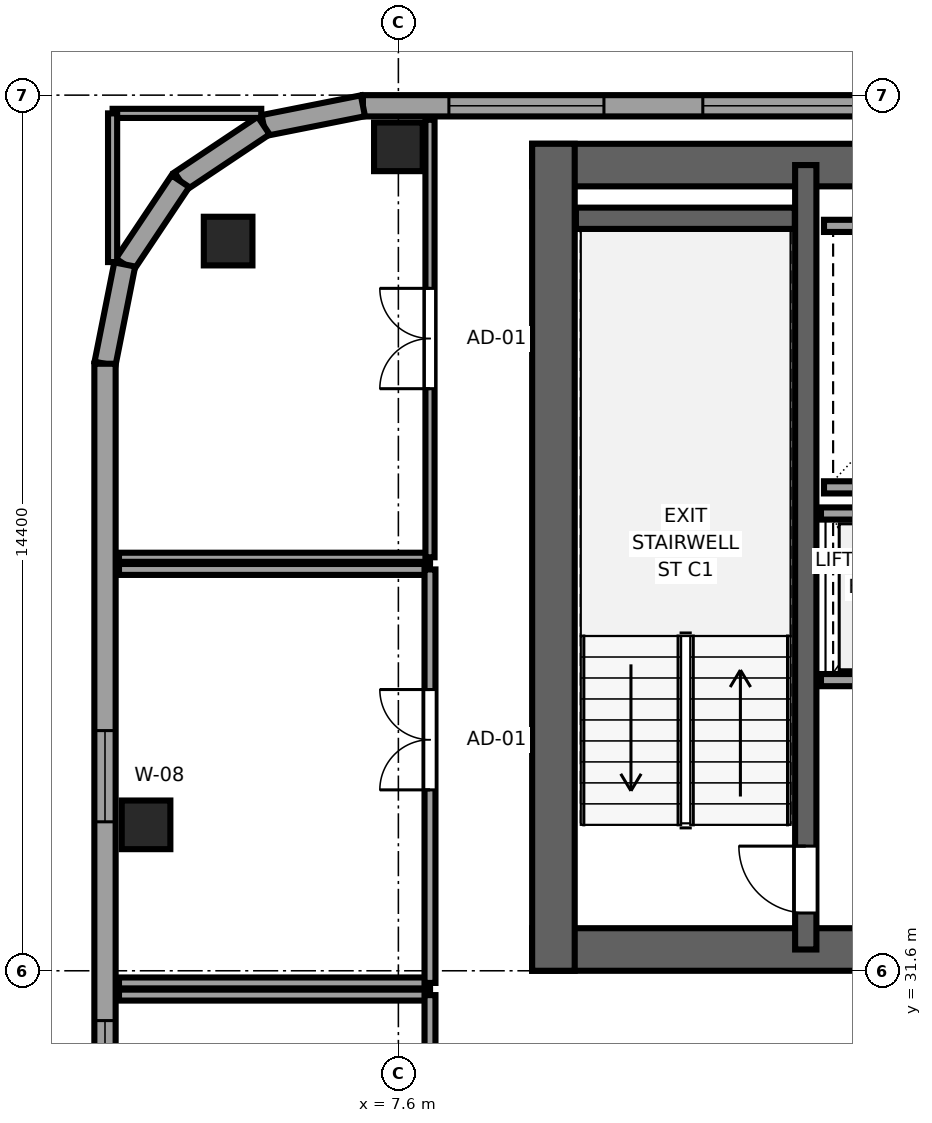
"""IFC4 building model, lengths in metres.
Left out: names, types, materials, properties, quantities, classifications, styles, units other than length and angle.
Written with IfcOpenShell. Run it as: python <this file> out.ifc"""

import sys

from ifc_helpers import new_model, si_unit, direction, frame, frame_2d, origin, origin_2d, place, context, subcontext, project, spatial, rectangle, extrude, source, transform, mapped, element, fill, save


model = new_model("IFC4")
c1 = context("Model", 3, precision=1e-05, world=origin(), true_north=direction((0.0, 1.0)))
c2 = subcontext(c1, "Body", "Model", "MODEL_VIEW")
j1 = project(units=[si_unit("LENGTHUNIT", "METRE"), si_unit("PLANEANGLEUNIT", "RADIAN")], contexts=[c1])
p1 = place(None, origin())
s1 = spatial("IfcSite", under=j1, at=p1, CompositionType="ELEMENT")
p2 = place(p1, origin())
s2 = spatial("IfcBuilding", under=s1, at=p2, CompositionType="ELEMENT")
p3 = place(p2, frame((0.0, 0.0, 171.9)))
s3 = spatial("IfcBuildingStorey", under=s2, at=p3, CompositionType="ELEMENT", Elevation=171.9)
p4 = place(p3, frame((9.8, 31.95, 0.0), z_axis=(0.0, 0.0, 1.0), x_axis=(1.0, 0.0, 0.0)))
e1 = element("IfcWall", 1, at=p4, inside=s3, PredefinedType="SHEAR", context=c2, shape_type="SweptSolid", body=[
    extrude(rectangle(XDim=26.4, YDim=0.7, at=frame_2d((13.2, 0.0))), origin(), (0.0, 0.0, 1.0), 3.55),
])
p5 = place(p4, frame((7.65, 0.0, 0.0), z_axis=(0.0, 0.0, 1.0), x_axis=(-1.0, 0.0, 0.0)))
e2 = element("IfcOpeningElement", 2, at=p5, cuts=e1, PredefinedType="OPENING", context=c2, shape_type="SweptSolid", body=[
    extrude(rectangle(XDim=1.5, YDim=2.04, at=frame_2d((0.75, 1.02))), frame((0.0, 0.36, 0.0), z_axis=(0.0, -1.0, 0.0), x_axis=(1.0, 0.0, 0.0)), (0.0, 0.0, 1.0), 0.72),
])
p6 = place(p4, frame((13.95, 0.0, 0.0), z_axis=(0.0, 0.0, 1.0), x_axis=(-1.0, 0.0, 0.0)))
e3 = element("IfcOpeningElement", 3, at=p6, cuts=e1, PredefinedType="OPENING", context=c2, shape_type="SweptSolid", body=[
    extrude(rectangle(XDim=1.5, YDim=2.04, at=frame_2d((0.75, 1.02))), frame((0.0, 0.36, 0.0), z_axis=(0.0, -1.0, 0.0), x_axis=(1.0, 0.0, 0.0)), (0.0, 0.0, 1.0), 0.72),
])
p7 = place(p4, frame((20.25, 0.0, 0.0), z_axis=(0.0, 0.0, 1.0), x_axis=(-1.0, 0.0, 0.0)))
e4 = element("IfcOpeningElement", 4, at=p7, cuts=e1, PredefinedType="OPENING", context=c2, shape_type="SweptSolid", body=[
    extrude(rectangle(XDim=1.5, YDim=2.04, at=frame_2d((0.75, 1.02))), frame((0.0, 0.36, 0.0), z_axis=(0.0, -1.0, 0.0), x_axis=(1.0, 0.0, 0.0)), (0.0, 0.0, 1.0), 0.72),
])
p8 = place(p3, frame((9.8, 44.85, 0.0), z_axis=(0.0, 0.0, 1.0), x_axis=(1.0, 0.0, 0.0)))
e5 = element("IfcWall", 5, at=p8, inside=s3, PredefinedType="SHEAR", context=c2, shape_type="SweptSolid", body=[
    extrude(rectangle(XDim=26.4, YDim=0.7, at=frame_2d((13.2, 0.0))), origin(), (0.0, 0.0, 1.0), 3.55),
])
p9 = place(p3, frame((10.15, 31.6, 0.0), z_axis=(0.0, 0.0, 1.0), x_axis=(0.0, 1.0, 0.0)))
e6 = element("IfcWall", 6, at=p9, inside=s3, PredefinedType="SHEAR", context=c2, shape_type="SweptSolid", body=[
    extrude(rectangle(XDim=13.6, YDim=0.7, at=frame_2d((6.8, 0.0))), origin(), (0.0, 0.0, 1.0), 3.55),
])
p10 = place(p3, frame((14.3, 31.95, 0.0), z_axis=(0.0, 0.0, 1.0), x_axis=(0.0, 1.0, 0.0)))
e7 = element("IfcWall", 7, at=p10, inside=s3, PredefinedType="SHEAR", context=c2, shape_type="SweptSolid", body=[
    extrude(rectangle(XDim=12.9, YDim=0.35, at=frame_2d((6.45, 0.0))), origin(), (0.0, 0.0, 1.0), 3.55),
])
p11 = place(p10, frame((0.6, 0.0, 0.0)))
e8 = element("IfcOpeningElement", 8, at=p11, cuts=e7, PredefinedType="OPENING", context=c2, shape_type="SweptSolid", body=[
    extrude(rectangle(XDim=1.1, YDim=2.12, at=frame_2d((0.55, 1.06))), frame((0.0, 0.185, 0.0), z_axis=(0.0, -1.0, 0.0), x_axis=(1.0, 0.0, 0.0)), (0.0, 0.0, 1.0), 0.37),
])
p12 = place(p3, frame((10.52, 43.975, 0.0), z_axis=(0.0, 0.0, 1.0), x_axis=(1.0, 0.0, 0.0)))
e9 = element("IfcWall", 9, at=p12, inside=s3, PredefinedType="SHEAR", context=c2, shape_type="SweptSolid", body=[
    extrude(rectangle(XDim=3.6, YDim=0.35, at=frame_2d((1.8, 0.0))), origin(), (0.0, 0.0, 1.0), 3.55),
])
m1 = source(origin(), c2, "Body", "SweptSolid", [
    extrude(rectangle(XDim=0.8, YDim=0.8, at=origin_2d()), origin(), (0.0, 0.0, 1.0), 3.55),
])
for number, where, z_axis, x_axis in (
    (10, (4.8, 43.6, 0.0), (0.0, 0.0, 1.0), (1.0, 0.0, 0.0)),
    (11, (7.6, 45.15, 0.0), (0.0, 0.0, 1.0), (1.0, 0.0, 0.0)),
    (12, (3.45, 34.0, 0.0), (0.0, 0.0, 1.0), (1.0, 0.0, 0.0)),
):
    element("IfcColumn", number, at=place(p3, frame(where, z_axis=z_axis, x_axis=x_axis)), inside=s3, PredefinedType="COLUMN", context=c2, shape_type="MappedRepresentation", body=[
        mapped(m1, transform((0.0, 0.0, 0.0), x_axis=(1.0, 0.0, 0.0), y_axis=(0.0, 1.0, 0.0), z_axis=(0.0, 0.0, 1.0), scale=1.0)),
    ])
p13 = place(p3, frame((49.983, 45.825, 0.0), z_axis=(0.0, 0.0, 1.0), x_axis=(-1.0, 0.0, 0.0)))
e13 = element("IfcWall", 13, at=p13, inside=s3, PredefinedType="SOLIDWALL", context=c2, shape_type="SweptSolid", body=[
    extrude(rectangle(XDim=42.966, YDim=0.35, at=frame_2d((21.483, 0.0))), origin(), (0.0, 0.0, 1.0), 3.37),
])
p14 = place(p13, frame((1.413, 0.0, 0.68)))
e14 = element("IfcOpeningElement", 14, at=p14, cuts=e13, PredefinedType="OPENING", context=c2, shape_type="SweptSolid", body=[
    extrude(rectangle(XDim=2.55, YDim=1.92, at=frame_2d((1.275, 0.96))), frame((0.0, 0.185, 0.0), z_axis=(0.0, -1.0, 0.0), x_axis=(1.0, 0.0, 0.0)), (0.0, 0.0, 1.0), 0.37),
])
p15 = place(p13, frame((9.766, 0.0, 0.68)))
e15 = element("IfcOpeningElement", 15, at=p15, cuts=e13, PredefinedType="OPENING", context=c2, shape_type="SweptSolid", body=[
    extrude(rectangle(XDim=2.55, YDim=1.92, at=frame_2d((1.275, 0.96))), frame((0.0, 0.185, 0.0), z_axis=(0.0, -1.0, 0.0), x_axis=(1.0, 0.0, 0.0)), (0.0, 0.0, 1.0), 0.37),
])
p16 = place(p13, frame((13.943, 0.0, 0.68)))
e16 = element("IfcOpeningElement", 16, at=p16, cuts=e13, PredefinedType="OPENING", context=c2, shape_type="SweptSolid", body=[
    extrude(rectangle(XDim=2.55, YDim=1.92, at=frame_2d((1.275, 0.96))), frame((0.0, 0.185, 0.0), z_axis=(0.0, -1.0, 0.0), x_axis=(1.0, 0.0, 0.0)), (0.0, 0.0, 1.0), 0.37),
])
p17 = place(p13, frame((18.12, 0.0, 0.68)))
e17 = element("IfcOpeningElement", 17, at=p17, cuts=e13, PredefinedType="OPENING", context=c2, shape_type="SweptSolid", body=[
    extrude(rectangle(XDim=2.55, YDim=1.92, at=frame_2d((1.275, 0.96))), frame((0.0, 0.185, 0.0), z_axis=(0.0, -1.0, 0.0), x_axis=(1.0, 0.0, 0.0)), (0.0, 0.0, 1.0), 0.37),
])
p18 = place(p13, frame((22.296, 0.0, 0.68)))
e18 = element("IfcOpeningElement", 18, at=p18, cuts=e13, PredefinedType="OPENING", context=c2, shape_type="SweptSolid", body=[
    extrude(rectangle(XDim=2.55, YDim=1.92, at=frame_2d((1.275, 0.96))), frame((0.0, 0.185, 0.0), z_axis=(0.0, -1.0, 0.0), x_axis=(1.0, 0.0, 0.0)), (0.0, 0.0, 1.0), 0.37),
])
p19 = place(p13, frame((26.473, 0.0, 0.68)))
e19 = element("IfcOpeningElement", 19, at=p19, cuts=e13, PredefinedType="OPENING", context=c2, shape_type="SweptSolid", body=[
    extrude(rectangle(XDim=2.55, YDim=1.92, at=frame_2d((1.275, 0.96))), frame((0.0, 0.185, 0.0), z_axis=(0.0, -1.0, 0.0), x_axis=(1.0, 0.0, 0.0)), (0.0, 0.0, 1.0), 0.37),
])
p20 = place(p13, frame((30.649, 0.0, 0.68)))
e20 = element("IfcOpeningElement", 20, at=p20, cuts=e13, PredefinedType="OPENING", context=c2, shape_type="SweptSolid", body=[
    extrude(rectangle(XDim=2.55, YDim=1.92, at=frame_2d((1.275, 0.96))), frame((0.0, 0.185, 0.0), z_axis=(0.0, -1.0, 0.0), x_axis=(1.0, 0.0, 0.0)), (0.0, 0.0, 1.0), 0.37),
])
p21 = place(p13, frame((34.826, 0.0, 0.68)))
e21 = element("IfcOpeningElement", 21, at=p21, cuts=e13, PredefinedType="OPENING", context=c2, shape_type="SweptSolid", body=[
    extrude(rectangle(XDim=2.55, YDim=1.92, at=frame_2d((1.275, 0.96))), frame((0.0, 0.185, 0.0), z_axis=(0.0, -1.0, 0.0), x_axis=(1.0, 0.0, 0.0)), (0.0, 0.0, 1.0), 0.37),
])
p22 = place(p13, frame((39.002, 0.0, 0.68)))
e22 = element("IfcOpeningElement", 22, at=p22, cuts=e13, PredefinedType="OPENING", context=c2, shape_type="SweptSolid", body=[
    extrude(rectangle(XDim=2.55, YDim=1.92, at=frame_2d((1.275, 0.96))), frame((0.0, 0.185, 0.0), z_axis=(0.0, -1.0, 0.0), x_axis=(1.0, 0.0, 0.0)), (0.0, 0.0, 1.0), 0.37),
])
p23 = place(p3, frame((7.017, 45.825, 0.0), z_axis=(0.0, 0.0, 1.0), x_axis=(-0.980788844421, -0.195072403631, 0.0)))
e23 = element("IfcWall", 23, at=p23, inside=s3, PredefinedType="SOLIDWALL", context=c2, shape_type="SweptSolid", body=[
    extrude(rectangle(XDim=1.665, YDim=0.35, at=frame_2d((0.832, 0.0))), origin(), (0.0, 0.0, 1.0), 3.37),
])
for number, where, z_axis, x_axis in (
    (24, (5.385, 45.5, 0.0), (0.0, 0.0, 1.0), (-0.832, -0.556, 0.0)),
    (25, (4.015, 44.585, 0.0), (0.0, 0.0, 1.0), (-0.556, -0.831, 0.0)),
):
    element("IfcWall", number, at=place(p3, frame(where, z_axis=z_axis, x_axis=x_axis)), inside=s3, PredefinedType="SOLIDWALL", context=c2, shape_type="SweptSolid", body=[
        extrude(rectangle(XDim=1.647, YDim=0.35, at=frame_2d((0.824, 0.0))), origin(), (0.0, 0.0, 1.0), 2.832),
    ])
p24 = place(p3, frame((3.1, 43.216, 0.0), z_axis=(0.0, 0.0, 1.0), x_axis=(-0.195044345786, -0.980794424524, 0.0)))
e26 = element("IfcWall", 26, at=p24, inside=s3, PredefinedType="SOLIDWALL", context=c2, shape_type="SweptSolid", body=[
    extrude(rectangle(XDim=1.665, YDim=0.35, at=frame_2d((0.833, 0.0))), origin(), (0.0, 0.0, 1.0), 3.37),
])
p25 = place(p3, frame((2.775, 41.583, 0.0), z_axis=(0.0, 0.0, 1.0), x_axis=(0.0, -1.0, 0.0)))
e27 = element("IfcWall", 27, at=p25, inside=s3, PredefinedType="SOLIDWALL", context=c2, shape_type="SweptSolid", body=[
    extrude(rectangle(XDim=34.566, YDim=0.35, at=frame_2d((17.283, 0.0))), origin(), (0.0, 0.0, 1.0), 3.37),
])
p26 = place(p25, frame((10.802, 0.0, 0.68)))
e28 = element("IfcOpeningElement", 28, at=p26, cuts=e27, PredefinedType="OPENING", context=c2, shape_type="SweptSolid", body=[
    extrude(rectangle(XDim=2.55, YDim=1.92, at=frame_2d((1.275, 0.96))), frame((0.0, 0.185, 0.0), z_axis=(0.0, -1.0, 0.0), x_axis=(1.0, 0.0, 0.0)), (0.0, 0.0, 1.0), 0.37),
])
p27 = place(p25, frame((13.922, 0.0, 0.68)))
e29 = element("IfcOpeningElement", 29, at=p27, cuts=e27, PredefinedType="OPENING", context=c2, shape_type="SweptSolid", body=[
    extrude(rectangle(XDim=2.55, YDim=1.92, at=frame_2d((1.275, 0.96))), frame((0.0, 0.185, 0.0), z_axis=(0.0, -1.0, 0.0), x_axis=(1.0, 0.0, 0.0)), (0.0, 0.0, 1.0), 0.37),
])
p28 = place(p25, frame((22.264, 0.0, 0.68)))
e30 = element("IfcOpeningElement", 30, at=p28, cuts=e27, PredefinedType="OPENING", context=c2, shape_type="SweptSolid", body=[
    extrude(rectangle(XDim=2.55, YDim=1.92, at=frame_2d((1.275, 0.96))), frame((0.0, 0.185, 0.0), z_axis=(0.0, -1.0, 0.0), x_axis=(1.0, 0.0, 0.0)), (0.0, 0.0, 1.0), 0.37),
])
p29 = place(p25, frame((26.985, 0.0, 0.68)))
e31 = element("IfcOpeningElement", 31, at=p29, cuts=e27, PredefinedType="OPENING", context=c2, shape_type="SweptSolid", body=[
    extrude(rectangle(XDim=2.55, YDim=1.92, at=frame_2d((1.275, 0.96))), frame((0.0, 0.185, 0.0), z_axis=(0.0, -1.0, 0.0), x_axis=(1.0, 0.0, 0.0)), (0.0, 0.0, 1.0), 0.37),
])
p30 = place(p25, frame((6.033, 0.0, 0.62)))
e32 = element("IfcOpeningElement", 32, at=p30, cuts=e27, PredefinedType="OPENING", context=c2, shape_type="SweptSolid", body=[
    extrude(rectangle(XDim=1.5, YDim=1.55, at=frame_2d((0.75, 0.775))), frame((0.0, 0.185, 0.0), z_axis=(0.0, -1.0, 0.0), x_axis=(1.0, 0.0, 0.0)), (0.0, 0.0, 1.0), 0.37),
])
for number, where, z_axis, x_axis in (
    (33, (14.6, 39.55, 0.0), (0.0, 0.0, 1.0), (1.0, 0.0, 0.0)),
    (34, (14.6, 43.85, 0.0), (0.0, 0.0, 1.0), (1.0, 0.0, 0.0)),
):
    element("IfcWall", number, at=place(p3, frame(where, z_axis=z_axis, x_axis=x_axis)), inside=s3, PredefinedType="SOLIDWALL", context=c2, shape_type="SweptSolid", body=[
        extrude(rectangle(XDim=4.1, YDim=0.2, at=frame_2d((2.05, 0.0))), origin(), (0.0, 0.0, 1.0), 3.37),
    ])
p31 = place(p3, frame((14.55, 36.38, 0.0), z_axis=(0.0, 0.0, 1.0), x_axis=(1.0, 0.0, 0.0)))
e35 = element("IfcWall", 35, at=p31, inside=s3, PredefinedType="SOLIDWALL", context=c2, shape_type="SweptSolid", body=[
    extrude(rectangle(XDim=4.075, YDim=0.2, at=frame_2d((2.038, 0.0))), origin(), (0.0, 0.0, 1.0), 3.37),
])
p32 = place(p31, frame((0.55, 0.0, 0.0)))
e36 = element("IfcOpeningElement", 36, at=p32, cuts=e35, PredefinedType="OPENING", context=c2, shape_type="SweptSolid", body=[
    extrude(rectangle(XDim=1.1, YDim=2.12, at=frame_2d((0.55, 1.06))), frame((0.0, 0.11, 0.0), z_axis=(0.0, -1.0, 0.0), x_axis=(1.0, 0.0, 0.0)), (0.0, 0.0, 1.0), 0.22),
])
p33 = place(p31, frame((2.45, 0.0, 0.0)))
e37 = element("IfcOpeningElement", 37, at=p33, cuts=e35, PredefinedType="OPENING", context=c2, shape_type="SweptSolid", body=[
    extrude(rectangle(XDim=1.1, YDim=2.12, at=frame_2d((0.55, 1.06))), frame((0.0, 0.11, 0.0), z_axis=(0.0, -1.0, 0.0), x_axis=(1.0, 0.0, 0.0)), (0.0, 0.0, 1.0), 0.22),
])
p34 = place(p3, frame((14.55, 39.12, 0.0), z_axis=(0.0, 0.0, 1.0), x_axis=(1.0, 0.0, 0.0)))
e38 = element("IfcWall", 38, at=p34, inside=s3, PredefinedType="SOLIDWALL", context=c2, shape_type="SweptSolid", body=[
    extrude(rectangle(XDim=4.075, YDim=0.2, at=frame_2d((2.038, 0.0))), origin(), (0.0, 0.0, 1.0), 3.37),
])
p35 = place(p3, frame((3.005, 31.2, 0.0), z_axis=(0.0, 0.0, 1.0), x_axis=(1.0, 0.0, 0.0)))
e39 = element("IfcWall", 39, at=p35, inside=s3, PredefinedType="PARTITIONING", context=c2, shape_type="SweptSolid", body=[
    extrude(rectangle(XDim=5.115, YDim=0.18, at=frame_2d((2.558, 0.0))), origin(), (0.0, 0.0, 1.0), 3.37),
])
p36 = place(p3, frame((8.12, 23.1, 0.0), z_axis=(0.0, 0.0, 1.0), x_axis=(0.0, 1.0, 0.0)))
e40 = element("IfcWall", 40, at=p36, inside=s3, PredefinedType="PARTITIONING", context=c2, shape_type="SweptSolid", body=[
    extrude(rectangle(XDim=8.1, YDim=0.18, at=frame_2d((4.05, 0.0))), origin(), (0.0, 0.0, 1.0), 3.37),
])
p37 = place(p36, frame((3.225, 0.0, 0.0)))
e41 = element("IfcOpeningElement", 41, at=p37, cuts=e40, PredefinedType="OPENING", context=c2, shape_type="SweptSolid", body=[
    extrude(rectangle(XDim=1.65, YDim=2.15, at=frame_2d((0.825, 1.075))), frame((0.0, 0.1, 0.0), z_axis=(0.0, -1.0, 0.0), x_axis=(1.0, 0.0, 0.0)), (0.0, 0.0, 1.0), 0.2),
])
for number, where, z_axis, x_axis in (
    (42, (3.005, 31.4, 0.0), (0.0, 0.0, 1.0), (1.0, 0.0, 0.0)),
    (43, (3.005, 38.2, 0.0), (0.0, 0.0, 1.0), (1.0, 0.0, 0.0)),
):
    element("IfcWall", number, at=place(p3, frame(where, z_axis=z_axis, x_axis=x_axis)), inside=s3, PredefinedType="PARTITIONING", context=c2, shape_type="SweptSolid", body=[
        extrude(rectangle(XDim=5.115, YDim=0.18, at=frame_2d((2.558, 0.0))), origin(), (0.0, 0.0, 1.0), 3.37),
    ])
p38 = place(p3, frame((8.12, 31.4, 0.0), z_axis=(0.0, 0.0, 1.0), x_axis=(0.0, 1.0, 0.0)))
e44 = element("IfcWall", 44, at=p38, inside=s3, PredefinedType="PARTITIONING", context=c2, shape_type="SweptSolid", body=[
    extrude(rectangle(XDim=6.8, YDim=0.18, at=frame_2d((3.4, 0.0))), origin(), (0.0, 0.0, 1.0), 3.37),
])
p39 = place(p38, frame((3.175, 0.0, 0.0)))
e45 = element("IfcOpeningElement", 45, at=p39, cuts=e44, PredefinedType="OPENING", context=c2, shape_type="SweptSolid", body=[
    extrude(rectangle(XDim=1.65, YDim=2.15, at=frame_2d((0.825, 1.075))), frame((0.0, 0.1, 0.0), z_axis=(0.0, -1.0, 0.0), x_axis=(1.0, 0.0, 0.0)), (0.0, 0.0, 1.0), 0.2),
])
p40 = place(p3, frame((3.005, 38.4, 0.0), z_axis=(0.0, 0.0, 1.0), x_axis=(1.0, 0.0, 0.0)))
e46 = element("IfcWall", 46, at=p40, inside=s3, PredefinedType="PARTITIONING", context=c2, shape_type="SweptSolid", body=[
    extrude(rectangle(XDim=5.115, YDim=0.15, at=frame_2d((2.558, 0.0))), origin(), (0.0, 0.0, 1.0), 3.37),
])
for number, where, z_axis, x_axis in (
    (47, (2.9, 45.7, 0.0), (0.0, 0.0, 1.0), (1.0, 0.0, 0.0)),
    (48, (2.9, 43.255, 0.0), (0.0, 0.0, 1.0), (0.0, 1.0, 0.0)),
):
    element("IfcWall", number, at=place(p3, frame(where, z_axis=z_axis, x_axis=x_axis)), inside=s3, PredefinedType="PARTITIONING", context=c2, shape_type="SweptSolid", body=[
        extrude(rectangle(XDim=2.445, YDim=0.15, at=frame_2d((1.223, 0.0))), origin(), (0.0, 0.0, 1.0), 3.37),
    ])
p41 = place(p3, frame((8.12, 38.4, 0.0), z_axis=(0.0, 0.0, 1.0), x_axis=(0.0, 1.0, 0.0)))
e49 = element("IfcWall", 49, at=p41, inside=s3, PredefinedType="PARTITIONING", context=c2, shape_type="SweptSolid", body=[
    extrude(rectangle(XDim=7.195, YDim=0.15, at=frame_2d((3.598, 0.0))), origin(), (0.0, 0.0, 1.0), 3.37),
])
p42 = place(p41, frame((2.772, 0.0, 0.0)))
e50 = element("IfcOpeningElement", 50, at=p42, cuts=e49, PredefinedType="OPENING", context=c2, shape_type="SweptSolid", body=[
    extrude(rectangle(XDim=1.65, YDim=2.15, at=frame_2d((0.825, 1.075))), frame((0.0, 0.085, 0.0), z_axis=(0.0, -1.0, 0.0), x_axis=(1.0, 0.0, 0.0)), (0.0, 0.0, 1.0), 0.17),
])
m2 = source(origin(), c2, "Body", "SweptSolid", [
    extrude(rectangle(XDim=2.55, YDim=1.92, at=frame_2d((1.275, 0.96))), frame((0.0, 0.09, 0.0), z_axis=(0.0, -1.0, 0.0), x_axis=(1.0, 0.0, 0.0)), (0.0, 0.0, 1.0), 0.06),
])
p43 = place(p21, origin())
e51 = element("IfcWindow", 51, at=p43, inside=s3, PartitioningType="TRIPLE_PANEL_HORIZONTAL", PredefinedType="WINDOW", context=c2, shape_type="MappedRepresentation", body=[
    mapped(m2, transform((0.0, 0.0, 0.0), x_axis=(1.0, 0.0, 0.0), y_axis=(0.0, 1.0, 0.0), z_axis=(0.0, 0.0, 1.0), scale=1.0)),
])
fill(e21, e51)
p44 = place(p22, origin())
e52 = element("IfcWindow", 52, at=p44, inside=s3, PartitioningType="TRIPLE_PANEL_HORIZONTAL", PredefinedType="WINDOW", context=c2, shape_type="MappedRepresentation", body=[
    mapped(m2, transform((0.0, 0.0, 0.0), x_axis=(1.0, 0.0, 0.0), y_axis=(0.0, 1.0, 0.0), z_axis=(0.0, 0.0, 1.0), scale=1.0)),
])
fill(e22, e52)
p45 = place(p26, origin())
e53 = element("IfcWindow", 53, at=p45, inside=s3, PartitioningType="TRIPLE_PANEL_HORIZONTAL", PredefinedType="WINDOW", context=c2, shape_type="MappedRepresentation", body=[
    mapped(m2, transform((0.0, 0.0, 0.0), x_axis=(1.0, 0.0, 0.0), y_axis=(0.0, 1.0, 0.0), z_axis=(0.0, 0.0, 1.0), scale=1.0)),
])
fill(e28, e53)
m3 = source(origin(), c2, "Body", "SweptSolid", [
    extrude(rectangle(XDim=1.5, YDim=1.55, at=frame_2d((0.75, 0.775))), frame((0.0, 0.09, 0.0), z_axis=(0.0, -1.0, 0.0), x_axis=(1.0, 0.0, 0.0)), (0.0, 0.0, 1.0), 0.06),
])
p46 = place(p30, origin())
e54 = element("IfcWindow", 54, at=p46, inside=s3, PartitioningType="SINGLE_PANEL", PredefinedType="WINDOW", context=c2, shape_type="MappedRepresentation", body=[
    mapped(m3, transform((0.0, 0.0, 0.0), x_axis=(1.0, 0.0, 0.0), y_axis=(0.0, 1.0, 0.0), z_axis=(0.0, 0.0, 1.0), scale=1.0)),
])
fill(e32, e54)
m4 = source(origin(), c2, "Body", "SweptSolid", [
    extrude(rectangle(XDim=1.1, YDim=2.12, at=frame_2d((0.55, 1.06))), frame((0.0, 0.025, 0.0), z_axis=(0.0, -1.0, 0.0), x_axis=(1.0, 0.0, 0.0)), (0.0, 0.0, 1.0), 0.05),
])
p47 = place(p11, origin())
e55 = element("IfcDoor", 55, at=p47, inside=s3, OperationType="SINGLE_SWING_RIGHT", PredefinedType="DOOR", context=c2, shape_type="MappedRepresentation", body=[
    mapped(m4, transform((0.0, 0.0, 0.0), x_axis=(1.0, 0.0, 0.0), y_axis=(0.0, 1.0, 0.0), z_axis=(0.0, 0.0, 1.0), scale=1.0)),
])
fill(e8, e55)
m5 = source(origin(), c2, "Body", "SweptSolid", [
    extrude(rectangle(XDim=1.65, YDim=2.15, at=frame_2d((0.825, 1.075))), frame((0.0, 0.025, 0.0), z_axis=(0.0, -1.0, 0.0), x_axis=(1.0, 0.0, 0.0)), (0.0, 0.0, 1.0), 0.05),
])
p48 = place(p39, origin())
e56 = element("IfcDoor", 56, at=p48, inside=s3, OperationType="DOUBLE_DOOR_SINGLE_SWING", PredefinedType="DOOR", context=c2, shape_type="MappedRepresentation", body=[
    mapped(m5, transform((0.0, 0.0, 0.0), x_axis=(1.0, 0.0, 0.0), y_axis=(0.0, 1.0, 0.0), z_axis=(0.0, 0.0, 1.0), scale=1.0)),
])
fill(e45, e56)
p49 = place(p42, origin())
e57 = element("IfcDoor", 57, at=p49, inside=s3, OperationType="DOUBLE_DOOR_SINGLE_SWING", PredefinedType="DOOR", context=c2, shape_type="MappedRepresentation", body=[
    mapped(m5, transform((0.0, 0.0, 0.0), x_axis=(1.0, 0.0, 0.0), y_axis=(0.0, 1.0, 0.0), z_axis=(0.0, 0.0, 1.0), scale=1.0)),
])
fill(e50, e57)
save(model, sys.argv[1])
